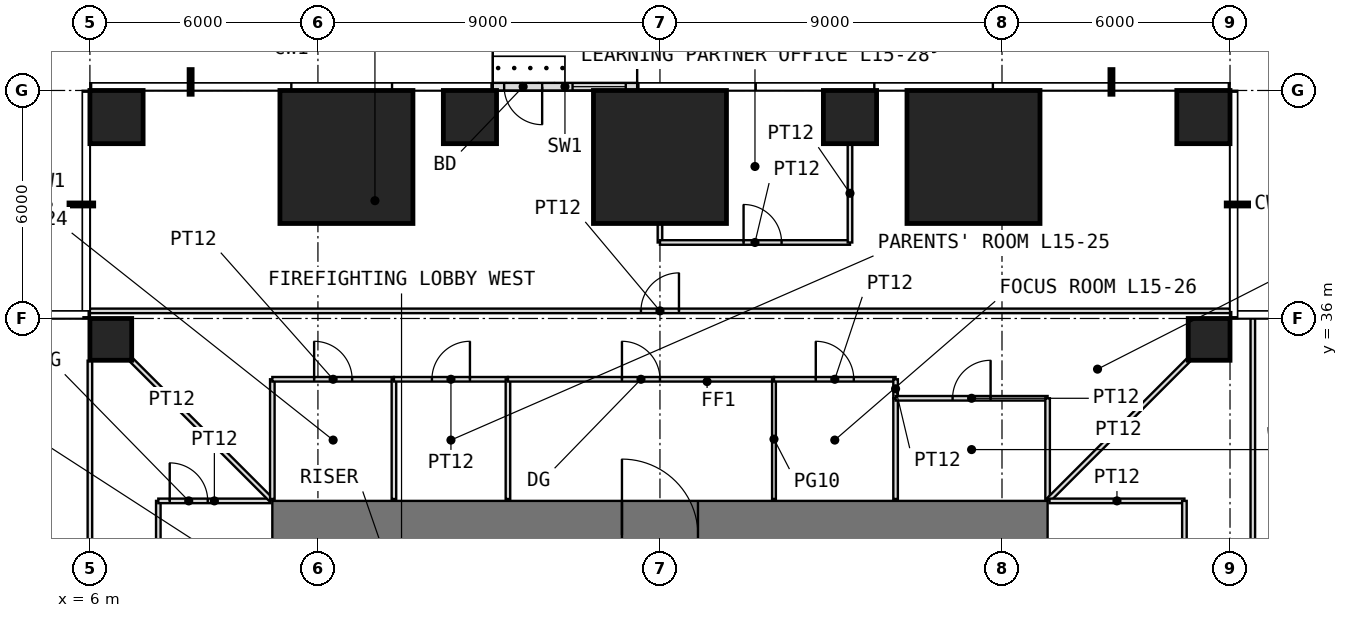
"""IFC4 building model, lengths in metres.
Left out: names, types, materials, properties, quantities, classifications, styles, units other than length and angle.
Written with IfcOpenShell. Run it as: python <this file> out.ifc"""

import sys

from ifc_helpers import new_model, si_unit, direction, frame, frame_2d, origin, origin_2d, place, context, subcontext, project, spatial, rectangle, extrude, element, fill, save


model = new_model("IFC4")
c1 = context("Model", 3, precision=1e-05, world=origin(), true_north=direction((0.0, 1.0)))
c2 = subcontext(c1, "Body", "Model", "MODEL_VIEW")
j1 = project(units=[si_unit("LENGTHUNIT", "METRE"), si_unit("PLANEANGLEUNIT", "RADIAN")], contexts=[c1])
p1 = place(None, origin())
s1 = spatial("IfcSite", under=j1, at=p1, CompositionType="ELEMENT")
p2 = place(p1, origin())
s2 = spatial("IfcBuilding", under=s1, at=p2, CompositionType="ELEMENT")
p3 = place(p2, frame((0.0, 0.0, 66.5)))
s3 = spatial("IfcBuildingStorey", under=s2, at=p3, CompositionType="ELEMENT", Elevation=66.5)
for number, where, z_axis, x_axis in (
    (1, (6.55, 35.45, 0.0), (0.0, 0.0, 1.0), (1.0, 0.0, 0.0)),
    (2, (35.45, 35.45, 0.0), (0.0, 0.0, 1.0), (1.0, 0.0, 0.0)),
):
    element("IfcColumn", number, at=place(p3, frame(where, z_axis=z_axis, x_axis=x_axis)), inside=s3, PredefinedType="COLUMN", context=c2, shape_type="SweptSolid", body=[
        extrude(rectangle(XDim=1.1, YDim=1.1, at=origin_2d()), origin(), (0.0, 0.0, 1.0), 4.0),
    ])
p4 = place(p3, frame((6.7, 41.3, 0.0), z_axis=(0.0, 0.0, 1.0), x_axis=(1.0, 0.0, 0.0)))
e3 = element("IfcColumn", 3, at=p4, inside=s3, PredefinedType="COLUMN", context=c2, shape_type="SweptSolid", body=[
    extrude(rectangle(XDim=1.4, YDim=1.4, at=origin_2d()), origin(), (0.0, 0.0, 1.0), 4.0),
])
p5 = place(p3, frame((12.75, 40.25, 0.0), z_axis=(0.0, 0.0, 1.0), x_axis=(1.0, 0.0, 0.0)))
e4 = element("IfcColumn", 4, at=p5, inside=s3, PredefinedType="COLUMN", context=c2, shape_type="SweptSolid", body=[
    extrude(rectangle(XDim=3.5, YDim=3.5, at=origin_2d()), origin(), (0.0, 0.0, 1.0), 4.0),
])
p6 = place(p3, frame((16.0, 41.3, 0.0), z_axis=(0.0, 0.0, 1.0), x_axis=(1.0, 0.0, 0.0)))
e5 = element("IfcColumn", 5, at=p6, inside=s3, PredefinedType="COLUMN", context=c2, shape_type="SweptSolid", body=[
    extrude(rectangle(XDim=1.4, YDim=1.4, at=origin_2d()), origin(), (0.0, 0.0, 1.0), 4.0),
])
p7 = place(p3, frame((21.0, 40.25, 0.0), z_axis=(0.0, 0.0, 1.0), x_axis=(1.0, 0.0, 0.0)))
e6 = element("IfcColumn", 6, at=p7, inside=s3, PredefinedType="COLUMN", context=c2, shape_type="SweptSolid", body=[
    extrude(rectangle(XDim=3.5, YDim=3.5, at=origin_2d()), origin(), (0.0, 0.0, 1.0), 4.0),
])
p8 = place(p3, frame((26.0, 41.3, 0.0), z_axis=(0.0, 0.0, 1.0), x_axis=(1.0, 0.0, 0.0)))
e7 = element("IfcColumn", 7, at=p8, inside=s3, PredefinedType="COLUMN", context=c2, shape_type="SweptSolid", body=[
    extrude(rectangle(XDim=1.4, YDim=1.4, at=origin_2d()), origin(), (0.0, 0.0, 1.0), 4.0),
])
p9 = place(p3, frame((29.25, 40.25, 0.0), z_axis=(0.0, 0.0, 1.0), x_axis=(1.0, 0.0, 0.0)))
e8 = element("IfcColumn", 8, at=p9, inside=s3, PredefinedType="COLUMN", context=c2, shape_type="SweptSolid", body=[
    extrude(rectangle(XDim=3.5, YDim=3.5, at=origin_2d()), origin(), (0.0, 0.0, 1.0), 4.0),
])
p10 = place(p3, frame((35.3, 41.3, 0.0), z_axis=(0.0, 0.0, 1.0), x_axis=(1.0, 0.0, 0.0)))
e9 = element("IfcColumn", 9, at=p10, inside=s3, PredefinedType="COLUMN", context=c2, shape_type="SweptSolid", body=[
    extrude(rectangle(XDim=1.4, YDim=1.4, at=origin_2d()), origin(), (0.0, 0.0, 1.0), 4.0),
])
p11 = place(p3, frame((20.4, 42.1, 0.0), z_axis=(0.0, 0.0, 1.0), x_axis=(-1.0, 0.0, 0.0)))
e10 = element("IfcWall", 10, at=p11, inside=s3, PredefinedType="USERDEFINED", context=c2, shape_type="SweptSolid", body=[
    extrude(rectangle(XDim=3.8, YDim=0.2, at=frame_2d((1.9, 0.0))), origin(), (0.0, 0.0, 1.0), 3.75),
])
p12 = place(p11, frame((2.5, 0.0, 0.0)))
e11 = element("IfcOpeningElement", 11, at=p12, cuts=e10, PredefinedType="OPENING", context=c2, shape_type="SweptSolid", body=[
    extrude(rectangle(XDim=1.0, YDim=2.4, at=frame_2d((0.5, 1.2))), frame((0.0, 0.11, 0.0), z_axis=(0.0, -1.0, 0.0), x_axis=(1.0, 0.0, 0.0)), (0.0, 0.0, 1.0), 0.22),
])
p13 = place(p11, frame((0.3, 0.0, 0.3)))
e12 = element("IfcOpeningElement", 12, at=p13, cuts=e10, PredefinedType="OPENING", context=c2, shape_type="SweptSolid", body=[
    extrude(rectangle(XDim=1.4, YDim=2.7, at=frame_2d((0.7, 1.35))), frame((0.0, 0.11, 0.0), z_axis=(0.0, -1.0, 0.0), x_axis=(1.0, 0.0, 0.0)), (0.0, 0.0, 1.0), 0.22),
])
p14 = place(p3, frame((10.8, 30.3, -0.05), z_axis=(0.0, 0.0, 1.0), x_axis=(1.0, 0.0, 0.0)))
e13 = element("IfcWall", 13, at=p14, inside=s3, PredefinedType="SHEAR", context=c2, shape_type="SweptSolid", body=[
    extrude(rectangle(XDim=20.4, YDim=1.8, at=frame_2d((10.2, 0.0))), origin(), (0.0, 0.0, 1.0), 4.0),
])
p15 = place(p14, frame((9.2, 0.0, 0.05)))
e14 = element("IfcOpeningElement", 14, at=p15, cuts=e13, PredefinedType="OPENING", context=c2, shape_type="SweptSolid", body=[
    extrude(rectangle(XDim=2.0, YDim=2.2, at=frame_2d((1.0, 1.1))), frame((0.0, 0.91, 0.0), z_axis=(0.0, -1.0, 0.0), x_axis=(1.0, 0.0, 0.0)), (0.0, 0.0, 1.0), 1.82),
])
p16 = place(p3, frame((6.0, 7.11, 0.0), z_axis=(0.0, 0.0, 1.0), x_axis=(0.0, 1.0, 0.0)))
e15 = element("IfcWall", 15, at=p16, inside=s3, PredefinedType="PARTITIONING", context=c2, shape_type="SweptSolid", body=[
    extrude(rectangle(XDim=27.78, YDim=0.12, at=frame_2d((13.89, 0.0))), origin(), (0.0, 0.0, 1.0), 3.75),
])
p17 = place(p16, frame((13.39, 0.0, 0.0)))
e16 = element("IfcOpeningElement", 16, at=p17, cuts=e15, PredefinedType="OPENING", context=c2, shape_type="SweptSolid", body=[
    extrude(rectangle(XDim=1.0, YDim=2.4, at=frame_2d((0.5, 1.2))), frame((0.0, 0.07, 0.0), z_axis=(0.0, -1.0, 0.0), x_axis=(1.0, 0.0, 0.0)), (0.0, 0.0, 1.0), 0.14),
])
p18 = place(p3, frame((6.0, 36.2, 0.0), z_axis=(0.0, 0.0, 1.0), x_axis=(1.0, 0.0, 0.0)))
e17 = element("IfcWall", 17, at=p18, inside=s3, PredefinedType="PARTITIONING", context=c2, shape_type="SweptSolid", body=[
    extrude(rectangle(XDim=30.0, YDim=0.12, at=frame_2d((15.0, 0.0))), origin(), (0.0, 0.0, 1.0), 3.75),
])
p19 = place(p18, frame((14.5, 0.0, 0.0)))
e18 = element("IfcOpeningElement", 18, at=p19, cuts=e17, PredefinedType="OPENING", context=c2, shape_type="SweptSolid", body=[
    extrude(rectangle(XDim=1.0, YDim=2.4, at=frame_2d((0.5, 1.2))), frame((0.0, 0.07, 0.0), z_axis=(0.0, -1.0, 0.0), x_axis=(1.0, 0.0, 0.0)), (0.0, 0.0, 1.0), 0.14),
])
p20 = place(p3, frame((7.11, 34.89, 0.0), z_axis=(0.0, 0.0, 1.0), x_axis=(0.707106781187, -0.707106781187, 0.0)))
e19 = element("IfcWall", 19, at=p20, inside=s3, PredefinedType="PARTITIONING", context=c2, shape_type="SweptSolid", body=[
    extrude(rectangle(XDim=2.95, YDim=0.12, at=frame_2d((1.475, 0.0))), origin(), (0.0, 0.0, 1.0), 3.75),
])
p21 = place(p3, frame((7.8, 28.4, 0.0), z_axis=(0.0, 0.0, 1.0), x_axis=(0.0, 1.0, 0.0)))
e20 = element("IfcWall", 20, at=p21, inside=s3, PredefinedType="PARTITIONING", context=c2, shape_type="SweptSolid", body=[
    extrude(rectangle(XDim=2.8, YDim=0.12, at=frame_2d((1.4, 0.0))), origin(), (0.0, 0.0, 1.0), 3.75),
])
p22 = place(p3, frame((7.8, 31.2, 0.0), z_axis=(0.0, 0.0, 1.0), x_axis=(1.0, 0.0, 0.0)))
e21 = element("IfcWall", 21, at=p22, inside=s3, PredefinedType="PARTITIONING", context=c2, shape_type="SweptSolid", body=[
    extrude(rectangle(XDim=2.95, YDim=0.12, at=frame_2d((1.475, 0.0))), origin(), (0.0, 0.0, 1.0), 3.75),
])
p23 = place(p22, frame((0.3, 0.0, 0.0)))
e22 = element("IfcOpeningElement", 22, at=p23, cuts=e21, PredefinedType="OPENING", context=c2, shape_type="SweptSolid", body=[
    extrude(rectangle(XDim=1.0, YDim=2.4, at=frame_2d((0.5, 1.2))), frame((0.0, 0.07, 0.0), z_axis=(0.0, -1.0, 0.0), x_axis=(1.0, 0.0, 0.0)), (0.0, 0.0, 1.0), 0.14),
])
p24 = place(p3, frame((9.196, 32.804, 0.0), z_axis=(0.0, 0.0, 1.0), x_axis=(0.707106781187, -0.707106781187, 0.0)))
e23 = element("IfcWall", 23, at=p24, inside=s3, PredefinedType="PARTITIONING", context=c2, shape_type="SweptSolid", body=[
    extrude(rectangle(XDim=2.218, YDim=0.12, at=frame_2d((1.109, 0.0))), origin(), (0.0, 0.0, 1.0), 3.75),
])
p25 = place(p3, frame((10.8, 31.25, 0.0), z_axis=(0.0, 0.0, 1.0), x_axis=(0.0, 1.0, 0.0)))
e24 = element("IfcWall", 24, at=p25, inside=s3, PredefinedType="PARTITIONING", context=c2, shape_type="SweptSolid", body=[
    extrude(rectangle(XDim=3.15, YDim=0.12, at=frame_2d((1.575, 0.0))), origin(), (0.0, 0.0, 1.0), 3.75),
])
p26 = place(p3, frame((10.8, 34.4, 0.0), z_axis=(0.0, 0.0, 1.0), x_axis=(1.0, 0.0, 0.0)))
e25 = element("IfcWall", 25, at=p26, inside=s3, PredefinedType="PARTITIONING", context=c2, shape_type="SweptSolid", body=[
    extrude(rectangle(XDim=3.2, YDim=0.12, at=frame_2d((1.6, 0.0))), origin(), (0.0, 0.0, 1.0), 3.75),
])
p27 = place(p26, frame((1.1, 0.0, 0.0)))
e26 = element("IfcOpeningElement", 26, at=p27, cuts=e25, PredefinedType="OPENING", context=c2, shape_type="SweptSolid", body=[
    extrude(rectangle(XDim=1.0, YDim=2.2, at=frame_2d((0.5, 1.1))), frame((0.0, 0.07, 0.0), z_axis=(0.0, -1.0, 0.0), x_axis=(1.0, 0.0, 0.0)), (0.0, 0.0, 1.0), 0.14),
])
p28 = place(p3, frame((14.0, 31.25, 0.0), z_axis=(0.0, 0.0, 1.0), x_axis=(0.0, 1.0, 0.0)))
e27 = element("IfcWall", 27, at=p28, inside=s3, PredefinedType="PARTITIONING", context=c2, shape_type="SweptSolid", body=[
    extrude(rectangle(XDim=3.15, YDim=0.12, at=frame_2d((1.575, 0.0))), origin(), (0.0, 0.0, 1.0), 3.75),
])
p29 = place(p3, frame((14.0, 34.4, 0.0), z_axis=(0.0, 0.0, 1.0), x_axis=(1.0, 0.0, 0.0)))
e28 = element("IfcWall", 28, at=p29, inside=s3, PredefinedType="PARTITIONING", context=c2, shape_type="SweptSolid", body=[
    extrude(rectangle(XDim=3.0, YDim=0.12, at=frame_2d((1.5, 0.0))), origin(), (0.0, 0.0, 1.0), 3.75),
])
p30 = place(p29, frame((1.0, 0.0, 0.0)))
e29 = element("IfcOpeningElement", 29, at=p30, cuts=e28, PredefinedType="OPENING", context=c2, shape_type="SweptSolid", body=[
    extrude(rectangle(XDim=1.0, YDim=2.2, at=frame_2d((0.5, 1.1))), frame((0.0, 0.07, 0.0), z_axis=(0.0, -1.0, 0.0), x_axis=(1.0, 0.0, 0.0)), (0.0, 0.0, 1.0), 0.14),
])
p31 = place(p3, frame((17.0, 31.25, 0.0), z_axis=(0.0, 0.0, 1.0), x_axis=(0.0, 1.0, 0.0)))
e30 = element("IfcWall", 30, at=p31, inside=s3, PredefinedType="PARTITIONING", context=c2, shape_type="SweptSolid", body=[
    extrude(rectangle(XDim=3.15, YDim=0.12, at=frame_2d((1.575, 0.0))), origin(), (0.0, 0.0, 1.0), 3.75),
])
p32 = place(p3, frame((17.0, 34.4, 0.0), z_axis=(0.0, 0.0, 1.0), x_axis=(1.0, 0.0, 0.0)))
e31 = element("IfcWall", 31, at=p32, inside=s3, PredefinedType="PARTITIONING", context=c2, shape_type="SweptSolid", body=[
    extrude(rectangle(XDim=7.0, YDim=0.12, at=frame_2d((3.5, 0.0))), origin(), (0.0, 0.0, 1.0), 3.75),
])
p33 = place(p32, frame((3.0, 0.0, 0.0)))
e32 = element("IfcOpeningElement", 32, at=p33, cuts=e31, PredefinedType="OPENING", context=c2, shape_type="SweptSolid", body=[
    extrude(rectangle(XDim=1.0, YDim=2.4, at=frame_2d((0.5, 1.2))), frame((0.0, 0.07, 0.0), z_axis=(0.0, -1.0, 0.0), x_axis=(1.0, 0.0, 0.0)), (0.0, 0.0, 1.0), 0.14),
])
p34 = place(p3, frame((21.0, 38.0, 0.0), z_axis=(0.0, 0.0, 1.0), x_axis=(0.0, 1.0, 0.0)))
e33 = element("IfcWall", 33, at=p34, inside=s3, PredefinedType="PARTITIONING", context=c2, shape_type="SweptSolid", body=[
    extrude(rectangle(XDim=0.49, YDim=0.12, at=frame_2d((0.245, 0.0))), origin(), (0.0, 0.0, 1.0), 3.75),
])
p35 = place(p3, frame((21.0, 38.0, 0.0), z_axis=(0.0, 0.0, 1.0), x_axis=(1.0, 0.0, 0.0)))
e34 = element("IfcWall", 34, at=p35, inside=s3, PredefinedType="PARTITIONING", context=c2, shape_type="SweptSolid", body=[
    extrude(rectangle(XDim=5.0, YDim=0.12, at=frame_2d((2.5, 0.0))), origin(), (0.0, 0.0, 1.0), 3.75),
])
p36 = place(p35, frame((2.2, 0.0, 0.0)))
e35 = element("IfcOpeningElement", 35, at=p36, cuts=e34, PredefinedType="OPENING", context=c2, shape_type="SweptSolid", body=[
    extrude(rectangle(XDim=1.0, YDim=2.2, at=frame_2d((0.5, 1.1))), frame((0.0, 0.07, 0.0), z_axis=(0.0, -1.0, 0.0), x_axis=(1.0, 0.0, 0.0)), (0.0, 0.0, 1.0), 0.14),
])
p37 = place(p3, frame((24.0, 31.25, 0.0), z_axis=(0.0, 0.0, 1.0), x_axis=(0.0, 1.0, 0.0)))
e36 = element("IfcWall", 36, at=p37, inside=s3, PredefinedType="PARTITIONING", context=c2, shape_type="SweptSolid", body=[
    extrude(rectangle(XDim=3.15, YDim=0.1, at=frame_2d((1.575, 0.0))), origin(), (0.0, 0.0, 1.0), 3.75),
])
p38 = place(p3, frame((24.0, 34.4, 0.0), z_axis=(0.0, 0.0, 1.0), x_axis=(1.0, 0.0, 0.0)))
e37 = element("IfcWall", 37, at=p38, inside=s3, PredefinedType="PARTITIONING", context=c2, shape_type="SweptSolid", body=[
    extrude(rectangle(XDim=3.2, YDim=0.12, at=frame_2d((1.6, 0.0))), origin(), (0.0, 0.0, 1.0), 3.75),
])
p39 = place(p38, frame((1.1, 0.0, 0.0)))
e38 = element("IfcOpeningElement", 38, at=p39, cuts=e37, PredefinedType="OPENING", context=c2, shape_type="SweptSolid", body=[
    extrude(rectangle(XDim=1.0, YDim=2.4, at=frame_2d((0.5, 1.2))), frame((0.0, 0.07, 0.0), z_axis=(0.0, -1.0, 0.0), x_axis=(1.0, 0.0, 0.0)), (0.0, 0.0, 1.0), 0.14),
])
p40 = place(p3, frame((26.0, 38.0, 0.0), z_axis=(0.0, 0.0, 1.0), x_axis=(0.0, 1.0, 0.0)))
e39 = element("IfcWall", 39, at=p40, inside=s3, PredefinedType="PARTITIONING", context=c2, shape_type="SweptSolid", body=[
    extrude(rectangle(XDim=2.59, YDim=0.12, at=frame_2d((1.295, 0.0))), origin(), (0.0, 0.0, 1.0), 3.75),
])
p41 = place(p3, frame((27.2, 31.25, 0.0), z_axis=(0.0, 0.0, 1.0), x_axis=(0.0, 1.0, 0.0)))
e40 = element("IfcWall", 40, at=p41, inside=s3, PredefinedType="PARTITIONING", context=c2, shape_type="SweptSolid", body=[
    extrude(rectangle(XDim=2.65, YDim=0.12, at=frame_2d((1.325, 0.0))), origin(), (0.0, 0.0, 1.0), 3.75),
])
p42 = place(p3, frame((27.2, 33.9, 0.0), z_axis=(0.0, 0.0, 1.0), x_axis=(0.0, 1.0, 0.0)))
e41 = element("IfcWall", 41, at=p42, inside=s3, PredefinedType="PARTITIONING", context=c2, shape_type="SweptSolid", body=[
    extrude(rectangle(XDim=0.5, YDim=0.12, at=frame_2d((0.25, 0.0))), origin(), (0.0, 0.0, 1.0), 3.75),
])
p43 = place(p3, frame((27.2, 33.9, 0.0), z_axis=(0.0, 0.0, 1.0), x_axis=(1.0, 0.0, 0.0)))
e42 = element("IfcWall", 42, at=p43, inside=s3, PredefinedType="PARTITIONING", context=c2, shape_type="SweptSolid", body=[
    extrude(rectangle(XDim=4.0, YDim=0.12, at=frame_2d((2.0, 0.0))), origin(), (0.0, 0.0, 1.0), 3.75),
])
p44 = place(p43, frame((1.5, 0.0, 0.0)))
e43 = element("IfcOpeningElement", 43, at=p44, cuts=e42, PredefinedType="OPENING", context=c2, shape_type="SweptSolid", body=[
    extrude(rectangle(XDim=1.0, YDim=2.2, at=frame_2d((0.5, 1.1))), frame((0.0, 0.07, 0.0), z_axis=(0.0, -1.0, 0.0), x_axis=(1.0, 0.0, 0.0)), (0.0, 0.0, 1.0), 0.14),
])
p45 = place(p3, frame((31.2, 31.25, 0.0), z_axis=(0.0, 0.0, 1.0), x_axis=(0.0, 1.0, 0.0)))
e44 = element("IfcWall", 44, at=p45, inside=s3, PredefinedType="PARTITIONING", context=c2, shape_type="SweptSolid", body=[
    extrude(rectangle(XDim=2.65, YDim=0.12, at=frame_2d((1.325, 0.0))), origin(), (0.0, 0.0, 1.0), 3.75),
])
p46 = place(p3, frame((31.235, 31.235, 0.0), z_axis=(0.0, 0.0, 1.0), x_axis=(0.707106781187, 0.707106781187, 0.0)))
e45 = element("IfcWall", 45, at=p46, inside=s3, PredefinedType="PARTITIONING", context=c2, shape_type="SweptSolid", body=[
    extrude(rectangle(XDim=5.168, YDim=0.12, at=frame_2d((2.584, 0.0))), origin(), (0.0, 0.0, 1.0), 3.75),
])
p47 = place(p3, frame((31.25, 31.2, 0.0), z_axis=(0.0, 0.0, 1.0), x_axis=(1.0, 0.0, 0.0)))
e46 = element("IfcWall", 46, at=p47, inside=s3, PredefinedType="PARTITIONING", context=c2, shape_type="SweptSolid", body=[
    extrude(rectangle(XDim=3.55, YDim=0.12, at=frame_2d((1.775, 0.0))), origin(), (0.0, 0.0, 1.0), 3.75),
])
p48 = place(p3, frame((34.8, 24.6, 0.0), z_axis=(0.0, 0.0, 1.0), x_axis=(0.0, 1.0, 0.0)))
e47 = element("IfcWall", 47, at=p48, inside=s3, PredefinedType="PARTITIONING", context=c2, shape_type="SweptSolid", body=[
    extrude(rectangle(XDim=6.6, YDim=0.12, at=frame_2d((3.3, 0.0))), origin(), (0.0, 0.0, 1.0), 3.75),
])
p49 = place(p48, frame((2.4, 0.0, 0.0)))
e48 = element("IfcOpeningElement", 48, at=p49, cuts=e47, PredefinedType="OPENING", context=c2, shape_type="SweptSolid", body=[
    extrude(rectangle(XDim=1.8, YDim=2.4, at=frame_2d((0.9, 1.2))), frame((0.0, 0.07, 0.0), z_axis=(0.0, -1.0, 0.0), x_axis=(1.0, 0.0, 0.0)), (0.0, 0.0, 1.0), 0.14),
])
p50 = place(p3, frame((36.6, 6.0, 0.0), z_axis=(0.0, 0.0, 1.0), x_axis=(0.0, 1.0, 0.0)))
e49 = element("IfcWall", 49, at=p50, inside=s3, PredefinedType="PARTITIONING", context=c2, shape_type="SweptSolid", body=[
    extrude(rectangle(XDim=30.0, YDim=0.12, at=frame_2d((15.0, 0.0))), origin(), (0.0, 0.0, 1.0), 3.75),
])
p51 = place(p50, frame((14.5, 0.0, 0.0)))
e50 = element("IfcOpeningElement", 50, at=p51, cuts=e49, PredefinedType="OPENING", context=c2, shape_type="SweptSolid", body=[
    extrude(rectangle(XDim=1.0, YDim=2.4, at=frame_2d((0.5, 1.2))), frame((0.0, 0.07, 0.0), z_axis=(0.0, -1.0, 0.0), x_axis=(1.0, 0.0, 0.0)), (0.0, 0.0, 1.0), 0.14),
])
p52 = place(p12, origin())
e51 = element("IfcDoor", 51, at=p52, inside=s3, OperationType="SINGLE_SWING_LEFT", PredefinedType="DOOR", context=c2, shape_type="SweptSolid", body=[
    extrude(rectangle(XDim=1.0, YDim=2.4, at=frame_2d((0.5, 1.2))), frame((0.0, 0.025, 0.0), z_axis=(0.0, -1.0, 0.0), x_axis=(1.0, 0.0, 0.0)), (0.0, 0.0, 1.0), 0.05),
])
fill(e11, e51)
p53 = place(p13, origin())
e52 = element("IfcWindow", 52, at=p53, inside=s3, PartitioningType="SINGLE_PANEL", PredefinedType="WINDOW", context=c2, shape_type="SweptSolid", body=[
    extrude(rectangle(XDim=1.4, YDim=2.7, at=frame_2d((0.7, 1.35))), frame((0.0, 0.03, 0.0), z_axis=(0.0, -1.0, 0.0), x_axis=(1.0, 0.0, 0.0)), (0.0, 0.0, 1.0), 0.06),
])
fill(e12, e52)
p54 = place(p15, origin())
e53 = element("IfcDoor", 53, at=p54, inside=s3, OperationType="DOUBLE_DOOR_SINGLE_SWING", PredefinedType="DOOR", context=c2, shape_type="SweptSolid", body=[
    extrude(rectangle(XDim=2.0, YDim=2.2, at=frame_2d((1.0, 1.1))), frame((0.0, 0.025, 0.0), z_axis=(0.0, -1.0, 0.0), x_axis=(1.0, 0.0, 0.0)), (0.0, 0.0, 1.0), 0.05),
])
fill(e14, e53)
p55 = place(p27, origin())
e54 = element("IfcDoor", 54, at=p55, inside=s3, OperationType="SINGLE_SWING_LEFT", PredefinedType="DOOR", context=c2, shape_type="SweptSolid", body=[
    extrude(rectangle(XDim=1.0, YDim=2.2, at=frame_2d((0.5, 1.1))), frame((0.0, 0.025, 0.0), z_axis=(0.0, -1.0, 0.0), x_axis=(1.0, 0.0, 0.0)), (0.0, 0.0, 1.0), 0.05),
])
fill(e26, e54)
p56 = place(p30, origin())
e55 = element("IfcDoor", 55, at=p56, inside=s3, OperationType="SINGLE_SWING_RIGHT", PredefinedType="DOOR", context=c2, shape_type="SweptSolid", body=[
    extrude(rectangle(XDim=1.0, YDim=2.2, at=frame_2d((0.5, 1.1))), frame((0.0, 0.025, 0.0), z_axis=(0.0, -1.0, 0.0), x_axis=(1.0, 0.0, 0.0)), (0.0, 0.0, 1.0), 0.05),
])
fill(e29, e55)
p57 = place(p39, origin())
e56 = element("IfcDoor", 56, at=p57, inside=s3, OperationType="SINGLE_SWING_LEFT", PredefinedType="DOOR", context=c2, shape_type="SweptSolid", body=[
    extrude(rectangle(XDim=1.0, YDim=2.4, at=frame_2d((0.5, 1.2))), frame((0.0, 0.025, 0.0), z_axis=(0.0, -1.0, 0.0), x_axis=(1.0, 0.0, 0.0)), (0.0, 0.0, 1.0), 0.05),
])
fill(e38, e56)
p58 = place(p44, origin())
e57 = element("IfcDoor", 57, at=p58, inside=s3, OperationType="SINGLE_SWING_RIGHT", PredefinedType="DOOR", context=c2, shape_type="SweptSolid", body=[
    extrude(rectangle(XDim=1.0, YDim=2.2, at=frame_2d((0.5, 1.1))), frame((0.0, 0.025, 0.0), z_axis=(0.0, -1.0, 0.0), x_axis=(1.0, 0.0, 0.0)), (0.0, 0.0, 1.0), 0.05),
])
fill(e43, e57)
p59 = place(p36, origin())
e58 = element("IfcDoor", 58, at=p59, inside=s3, OperationType="SINGLE_SWING_LEFT", PredefinedType="DOOR", context=c2, shape_type="SweptSolid", body=[
    extrude(rectangle(XDim=1.0, YDim=2.2, at=frame_2d((0.5, 1.1))), frame((0.0, 0.025, 0.0), z_axis=(0.0, -1.0, 0.0), x_axis=(1.0, 0.0, 0.0)), (0.0, 0.0, 1.0), 0.05),
])
fill(e35, e58)
p60 = place(p19, origin())
e59 = element("IfcDoor", 59, at=p60, inside=s3, OperationType="SINGLE_SWING_RIGHT", PredefinedType="DOOR", context=c2, shape_type="SweptSolid", body=[
    extrude(rectangle(XDim=1.0, YDim=2.4, at=frame_2d((0.5, 1.2))), frame((0.0, 0.025, 0.0), z_axis=(0.0, -1.0, 0.0), x_axis=(1.0, 0.0, 0.0)), (0.0, 0.0, 1.0), 0.05),
])
fill(e18, e59)
p61 = place(p33, origin())
e60 = element("IfcDoor", 60, at=p61, inside=s3, OperationType="SINGLE_SWING_LEFT", PredefinedType="DOOR", context=c2, shape_type="SweptSolid", body=[
    extrude(rectangle(XDim=1.0, YDim=2.4, at=frame_2d((0.5, 1.2))), frame((0.0, 0.025, 0.0), z_axis=(0.0, -1.0, 0.0), x_axis=(1.0, 0.0, 0.0)), (0.0, 0.0, 1.0), 0.05),
])
fill(e32, e60)
p62 = place(p23, origin())
e61 = element("IfcDoor", 61, at=p62, inside=s3, OperationType="SINGLE_SWING_LEFT", PredefinedType="DOOR", context=c2, shape_type="SweptSolid", body=[
    extrude(rectangle(XDim=1.0, YDim=2.4, at=frame_2d((0.5, 1.2))), frame((0.0, 0.025, 0.0), z_axis=(0.0, -1.0, 0.0), x_axis=(1.0, 0.0, 0.0)), (0.0, 0.0, 1.0), 0.05),
])
fill(e22, e61)
save(model, sys.argv[1])
